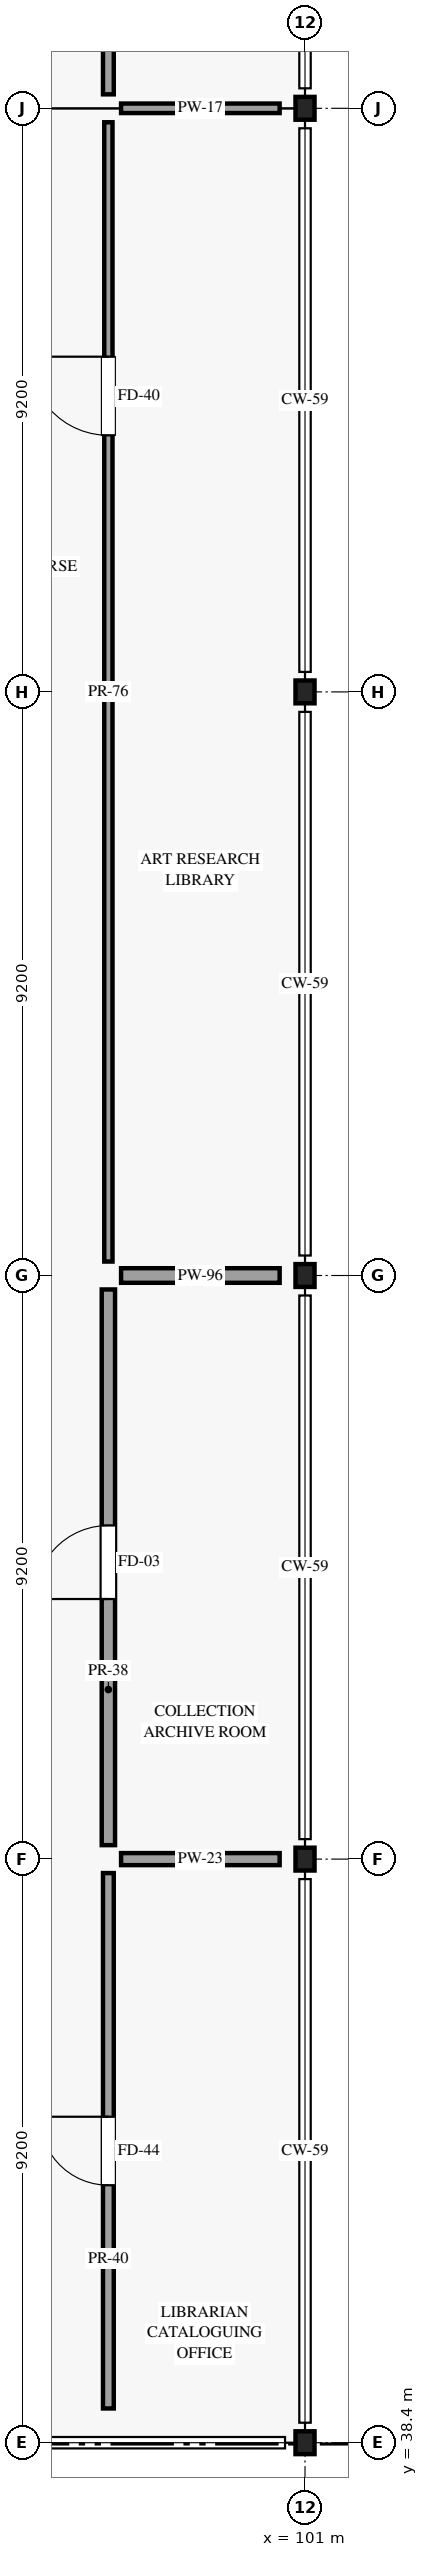
"""IFC4 building model, lengths in metres.
Left out: names, types, materials, properties, quantities, classifications, styles, units other than length and angle.
Written with IfcOpenShell. Run it as: python <this file> out.ifc"""

import sys

from ifc_helpers import new_model, si_unit, direction, frame, frame_2d, origin, origin_2d, place, context, subcontext, project, spatial, rectangle, i_section, extrude, element, fill, save


model = new_model("IFC4")
c1 = context("Model", 3, precision=1e-05, world=origin(), true_north=direction((0.0, 1.0)))
c2 = subcontext(c1, "Body", "Model", "MODEL_VIEW")
j1 = project(units=[si_unit("LENGTHUNIT", "METRE"), si_unit("PLANEANGLEUNIT", "RADIAN")], contexts=[c1])
p1 = place(None, origin())
s1 = spatial("IfcSite", under=j1, at=p1, CompositionType="ELEMENT")
p2 = place(p1, origin())
s2 = spatial("IfcBuilding", under=s1, at=p2, CompositionType="ELEMENT")
p3 = place(p2, frame((0.0, 0.0, 15.0)))
s3 = spatial("IfcBuildingStorey", under=s2, at=p3, CompositionType="ELEMENT", Elevation=15.0)
for number, where, z_axis, x_axis in (
    (1, (101.0, 38.4, 0.0), (0.0, 0.0, 1.0), (1.0, 0.0, 0.0)),
    (2, (101.0, 47.6, 0.0), (0.0, 0.0, 1.0), (1.0, 0.0, 0.0)),
    (3, (101.0, 56.8, 0.0), (0.0, 0.0, 1.0), (1.0, 0.0, 0.0)),
    (4, (101.0, 66.0, 0.0), (0.0, 0.0, 1.0), (1.0, 0.0, 0.0)),
    (5, (101.0, 75.2, 0.0), (0.0, 0.0, 1.0), (1.0, 0.0, 0.0)),
):
    element("IfcColumn", number, at=place(p3, frame(where, z_axis=z_axis, x_axis=x_axis)), inside=s3, PredefinedType="COLUMN", context=c2, shape_type="SweptSolid", body=[
        extrude(i_section(OverallWidth=0.3, OverallDepth=0.36, WebThickness=0.012, FlangeThickness=0.022, FilletRadius=0.027, at=origin_2d()), origin(), (0.0, 0.0, 1.0), 4.5),
    ])
p4 = place(p3, frame((97.9, 38.94, 0.0), z_axis=(0.0, 0.0, 1.0), x_axis=(0.0, 1.0, 0.0)))
e6 = element("IfcWall", 6, at=p4, inside=s3, PredefinedType="PARTITIONING", context=c2, shape_type="SweptSolid", body=[
    extrude(rectangle(XDim=8.44, YDim=0.17, at=frame_2d((4.22, 0.0))), origin(), (0.0, 0.0, 1.0), 3.675),
])
p5 = place(p4, frame((3.519, 0.0, 0.0)))
e7 = element("IfcOpeningElement", 7, at=p5, cuts=e6, PredefinedType="OPENING", context=c2, shape_type="SweptSolid", body=[
    extrude(rectangle(XDim=1.08, YDim=2.24, at=frame_2d((0.54, 1.12))), frame((0.0, 0.095, 0.0), z_axis=(0.0, -1.0, 0.0), x_axis=(1.0, 0.0, 0.0)), (0.0, 0.0, 1.0), 0.19),
])
p6 = place(p3, frame((98.1, 47.6, 0.0), z_axis=(0.0, 0.0, 1.0), x_axis=(1.0, 0.0, 0.0)))
e8 = element("IfcWall", 8, at=p6, inside=s3, PredefinedType="PARTITIONING", context=c2, shape_type="SweptSolid", body=[
    extrude(rectangle(XDim=2.5, YDim=0.19, at=frame_2d((1.25, 0.0))), origin(), (0.0, 0.0, 1.0), 3.675),
])
p7 = place(p3, frame((97.9, 47.82, 0.0), z_axis=(0.0, 0.0, 1.0), x_axis=(0.0, 1.0, 0.0)))
e9 = element("IfcWall", 9, at=p7, inside=s3, PredefinedType="PARTITIONING", context=c2, shape_type="SweptSolid", body=[
    extrude(rectangle(XDim=8.76, YDim=0.21, at=frame_2d((4.38, 0.0))), origin(), (0.0, 0.0, 1.0), 3.675),
])
p8 = place(p7, frame((3.88, 0.0, 0.0)))
e10 = element("IfcOpeningElement", 10, at=p8, cuts=e9, PredefinedType="OPENING", context=c2, shape_type="SweptSolid", body=[
    extrude(rectangle(XDim=1.16, YDim=2.28, at=frame_2d((0.58, 1.14))), frame((0.0, 0.115, 0.0), z_axis=(0.0, -1.0, 0.0), x_axis=(1.0, 0.0, 0.0)), (0.0, 0.0, 1.0), 0.23),
])
p9 = place(p3, frame((98.1, 56.8, 0.0), z_axis=(0.0, 0.0, 1.0), x_axis=(1.0, 0.0, 0.0)))
e11 = element("IfcWall", 11, at=p9, inside=s3, PredefinedType="PARTITIONING", context=c2, shape_type="SweptSolid", body=[
    extrude(rectangle(XDim=2.5, YDim=0.23, at=frame_2d((1.25, 0.0))), origin(), (0.0, 0.0, 1.0), 3.675),
])
p10 = place(p3, frame((97.9, 57.02, 0.0), z_axis=(0.0, 0.0, 1.0), x_axis=(0.0, 1.0, 0.0)))
e12 = element("IfcWall", 12, at=p10, inside=s3, PredefinedType="PARTITIONING", context=c2, shape_type="SweptSolid", body=[
    extrude(rectangle(XDim=17.96, YDim=0.13, at=frame_2d((8.98, 0.0))), origin(), (0.0, 0.0, 1.0), 3.675),
])
p11 = place(p10, frame((13.024, 0.0, 0.0)))
e13 = element("IfcOpeningElement", 13, at=p11, cuts=e12, PredefinedType="OPENING", context=c2, shape_type="SweptSolid", body=[
    extrude(rectangle(XDim=1.24, YDim=2.32, at=frame_2d((0.62, 1.16))), frame((0.0, 0.075, 0.0), z_axis=(0.0, -1.0, 0.0), x_axis=(1.0, 0.0, 0.0)), (0.0, 0.0, 1.0), 0.15),
])
p12 = place(p3, frame((98.1, 75.2, 0.0), z_axis=(0.0, 0.0, 1.0), x_axis=(1.0, 0.0, 0.0)))
e14 = element("IfcWall", 14, at=p12, inside=s3, PredefinedType="PARTITIONING", context=c2, shape_type="SweptSolid", body=[
    extrude(rectangle(XDim=2.5, YDim=0.15, at=frame_2d((1.25, 0.0))), origin(), (0.0, 0.0, 1.0), 3.675),
])
p13 = place(p3, frame((97.9, 75.42, 0.0), z_axis=(0.0, 0.0, 1.0), x_axis=(0.0, 1.0, 0.0)))
e15 = element("IfcWall", 15, at=p13, inside=s3, PredefinedType="PARTITIONING", context=c2, shape_type="SweptSolid", body=[
    extrude(rectangle(XDim=8.44, YDim=0.17, at=frame_2d((4.22, 0.0))), origin(), (0.0, 0.0, 1.0), 3.675),
])
p14 = place(p13, frame((3.572, 0.0, 0.0)))
e16 = element("IfcOpeningElement", 16, at=p14, cuts=e15, PredefinedType="OPENING", context=c2, shape_type="SweptSolid", body=[
    extrude(rectangle(XDim=1.46, YDim=2.32, at=frame_2d((0.73, 1.16))), frame((0.0, 0.095, 0.0), z_axis=(0.0, -1.0, 0.0), x_axis=(1.0, 0.0, 0.0)), (0.0, 0.0, 1.0), 0.19),
])
p15 = place(p5, origin())
e17 = element("IfcDoor", 17, at=p15, inside=s3, OperationType="SINGLE_SWING_RIGHT", PredefinedType="DOOR", context=c2, shape_type="SweptSolid", body=[
    extrude(rectangle(XDim=1.08, YDim=2.24, at=frame_2d((0.54, 1.12))), frame((0.0, 0.025, 0.0), z_axis=(0.0, -1.0, 0.0), x_axis=(1.0, 0.0, 0.0)), (0.0, 0.0, 1.0), 0.05),
])
fill(e7, e17)
p16 = place(p8, origin())
e18 = element("IfcDoor", 18, at=p16, inside=s3, OperationType="SINGLE_SWING_LEFT", PredefinedType="DOOR", context=c2, shape_type="SweptSolid", body=[
    extrude(rectangle(XDim=1.16, YDim=2.28, at=frame_2d((0.58, 1.14))), frame((0.0, 0.025, 0.0), z_axis=(0.0, -1.0, 0.0), x_axis=(1.0, 0.0, 0.0)), (0.0, 0.0, 1.0), 0.05),
])
fill(e10, e18)
p17 = place(p11, origin())
e19 = element("IfcDoor", 19, at=p17, inside=s3, OperationType="SINGLE_SWING_RIGHT", PredefinedType="DOOR", context=c2, shape_type="SweptSolid", body=[
    extrude(rectangle(XDim=1.24, YDim=2.32, at=frame_2d((0.62, 1.16))), frame((0.0, 0.025, 0.0), z_axis=(0.0, -1.0, 0.0), x_axis=(1.0, 0.0, 0.0)), (0.0, 0.0, 1.0), 0.05),
])
fill(e13, e19)
save(model, sys.argv[1])
